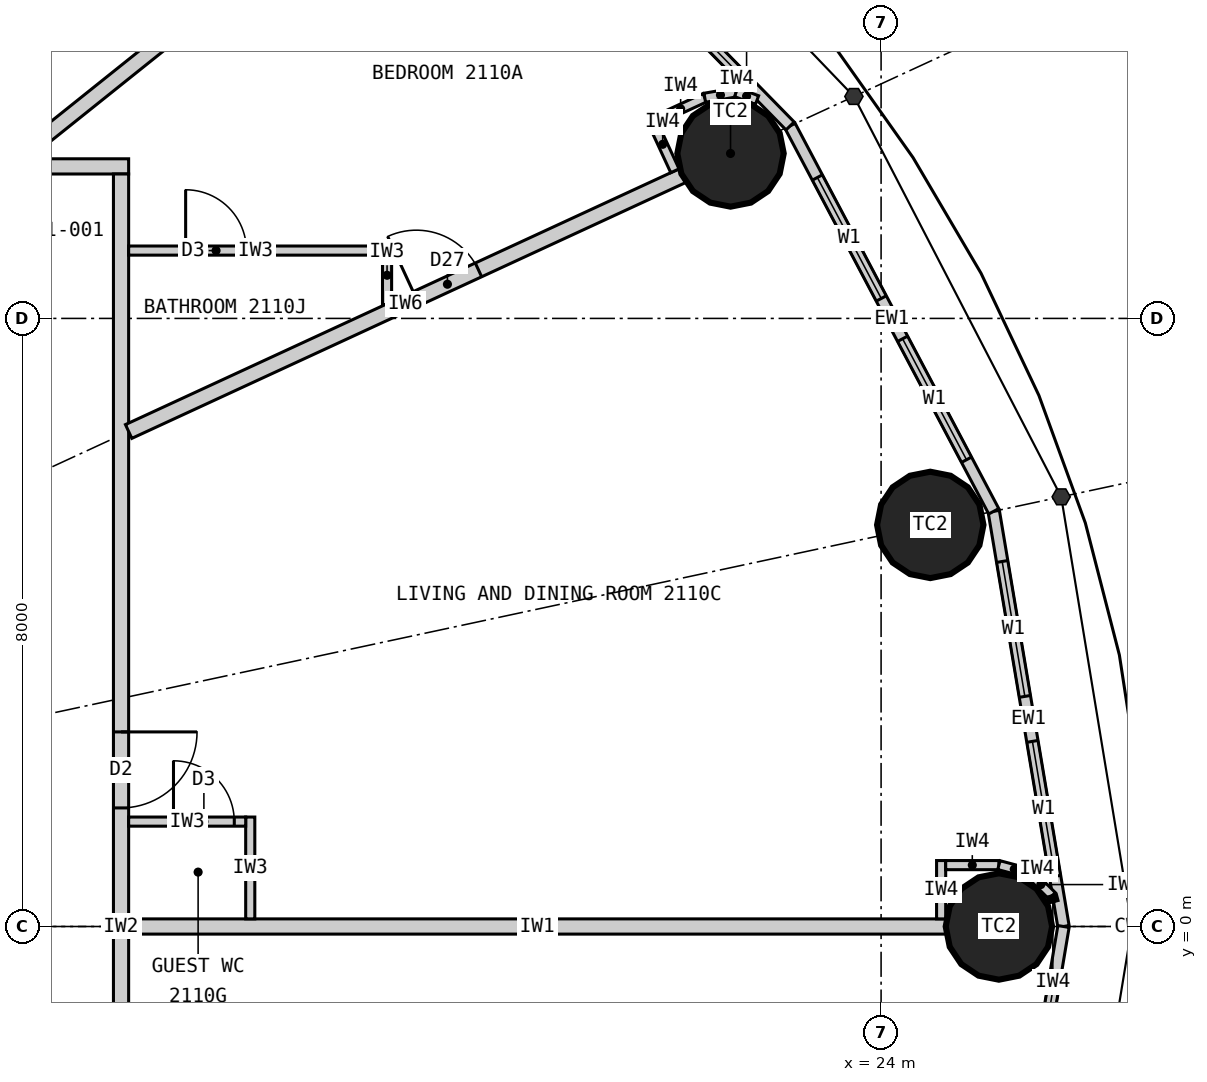
"""IFC4 building model, lengths in metres.
Left out: names, types, materials, properties, quantities, classifications, styles, units other than length and angle.
Written with IfcOpenShell. Run it as: python <this file> out.ifc"""

import sys

from ifc_helpers import new_model, si_unit, direction, frame, frame_2d, origin, origin_2d, place, context, subcontext, project, spatial, rectangle, circle, extrude, element, fill, save


model = new_model("IFC4")
c1 = context("Model", 3, precision=1e-05, world=origin(), true_north=direction((0.0, 1.0)))
c2 = subcontext(c1, "Body", "Model", "MODEL_VIEW")
j1 = project(units=[si_unit("LENGTHUNIT", "METRE"), si_unit("PLANEANGLEUNIT", "RADIAN")], contexts=[c1])
p1 = place(None, origin())
s1 = spatial("IfcSite", under=j1, at=p1, CompositionType="ELEMENT")
p2 = place(p1, origin())
s2 = spatial("IfcBuilding", under=s1, at=p2, CompositionType="ELEMENT")
p3 = place(p2, frame((0.0, 0.0, 83.7)))
s3 = spatial("IfcBuildingStorey", under=s2, at=p3, CompositionType="ELEMENT", Elevation=83.7)
for number, where, z_axis, x_axis in (
    (1, (25.55, 0.0, 0.0), (0.0, 0.0, 1.0), (1.0, 0.0, 0.0)),
    (2, (24.647, 5.283, 0.0), (0.0, 0.0, 1.0), (1.0, 0.0, 0.0)),
    (3, (22.019, 10.17, 0.0), (0.0, 0.0, 1.0), (1.0, 0.0, 0.0)),
):
    element("IfcColumn", number, at=place(p3, frame(where, z_axis=z_axis, x_axis=x_axis)), inside=s3, PredefinedType="COLUMN", context=c2, shape_type="SweptSolid", body=[
        extrude(circle(Radius=0.7, at=origin_2d()), origin(), (0.0, 0.0, 1.0), 3.3),
    ])
p4 = place(p3, frame((26.4, 0.0, 0.0), z_axis=(0.0, 0.0, 1.0), x_axis=(-0.165642551694, 0.986185857264, 0.0)))
e4 = element("IfcWall", 4, at=p4, inside=s3, PredefinedType="ELEMENTEDWALL", context=c2, shape_type="SweptSolid", body=[
    extrude(rectangle(XDim=5.539, YDim=0.15, at=frame_2d((2.77, 0.0))), origin(), (0.0, 0.0, 1.0), 3.12),
])
p5 = place(p4, frame((0.669, 0.0, 0.9)))
e5 = element("IfcOpeningElement", 5, at=p5, cuts=e4, PredefinedType="OPENING", context=c2, shape_type="SweptSolid", body=[
    extrude(rectangle(XDim=1.8, YDim=1.9, at=frame_2d((0.9, 0.95))), frame((0.0, 0.085, 0.0), z_axis=(0.0, -1.0, 0.0), x_axis=(1.0, 0.0, 0.0)), (0.0, 0.0, 1.0), 0.17),
])
p6 = place(p4, frame((3.07, 0.0, 0.9)))
e6 = element("IfcOpeningElement", 6, at=p6, cuts=e4, PredefinedType="OPENING", context=c2, shape_type="SweptSolid", body=[
    extrude(rectangle(XDim=1.8, YDim=1.9, at=frame_2d((0.9, 0.95))), frame((0.0, 0.085, 0.0), z_axis=(0.0, -1.0, 0.0), x_axis=(1.0, 0.0, 0.0)), (0.0, 0.0, 1.0), 0.17),
])
p7 = place(p3, frame((25.482, 5.462, 0.0), z_axis=(0.0, 0.0, 1.0), x_axis=(-0.467296867008, 0.884100468321, 0.0)))
e7 = element("IfcWall", 7, at=p7, inside=s3, PredefinedType="ELEMENTEDWALL", context=c2, shape_type="SweptSolid", body=[
    extrude(rectangle(XDim=5.734, YDim=0.15, at=frame_2d((2.867, 0.0))), origin(), (0.0, 0.0, 1.0), 3.12),
])
p8 = place(p7, frame((0.767, 0.0, 0.9)))
e8 = element("IfcOpeningElement", 8, at=p8, cuts=e7, PredefinedType="OPENING", context=c2, shape_type="SweptSolid", body=[
    extrude(rectangle(XDim=1.8, YDim=1.9, at=frame_2d((0.9, 0.95))), frame((0.0, 0.085, 0.0), z_axis=(0.0, -1.0, 0.0), x_axis=(1.0, 0.0, 0.0)), (0.0, 0.0, 1.0), 0.17),
])
p9 = place(p7, frame((3.167, 0.0, 0.9)))
e9 = element("IfcOpeningElement", 9, at=p9, cuts=e7, PredefinedType="OPENING", context=c2, shape_type="SweptSolid", body=[
    extrude(rectangle(XDim=1.8, YDim=1.9, at=frame_2d((0.9, 0.95))), frame((0.0, 0.085, 0.0), z_axis=(0.0, -1.0, 0.0), x_axis=(1.0, 0.0, 0.0)), (0.0, 0.0, 1.0), 0.17),
])
p10 = place(p3, frame((22.803, 10.532, 0.0), z_axis=(0.0, 0.0, 1.0), x_axis=(-0.699602905915, 0.714531856557, 0.0)))
e10 = element("IfcWall", 10, at=p10, inside=s3, PredefinedType="ELEMENTEDWALL", context=c2, shape_type="SweptSolid", body=[
    extrude(rectangle(XDim=6.051, YDim=0.15, at=frame_2d((3.025, 0.0))), origin(), (0.0, 0.0, 1.0), 3.12),
])
p11 = place(p10, frame((0.926, 0.0, 0.9)))
e11 = element("IfcOpeningElement", 11, at=p11, cuts=e10, PredefinedType="OPENING", context=c2, shape_type="SweptSolid", body=[
    extrude(rectangle(XDim=1.8, YDim=1.9, at=frame_2d((0.9, 0.95))), frame((0.0, 0.085, 0.0), z_axis=(0.0, -1.0, 0.0), x_axis=(1.0, 0.0, 0.0)), (0.0, 0.0, 1.0), 0.17),
])
p12 = place(p10, frame((3.325, 0.0, 0.9)))
e12 = element("IfcOpeningElement", 12, at=p12, cuts=e10, PredefinedType="OPENING", context=c2, shape_type="SweptSolid", body=[
    extrude(rectangle(XDim=1.8, YDim=1.9, at=frame_2d((0.9, 0.95))), frame((0.0, 0.085, 0.0), z_axis=(0.0, -1.0, 0.0), x_axis=(1.0, 0.0, 0.0)), (0.0, 0.0, 1.0), 0.17),
])
p13 = place(p3, frame((25.482, -5.462, 0.0), z_axis=(0.0, 0.0, 1.0), x_axis=(0.165642551694, 0.986185857264, 0.0)))
e13 = element("IfcWall", 13, at=p13, inside=s3, PredefinedType="ELEMENTEDWALL", context=c2, shape_type="SweptSolid", body=[
    extrude(rectangle(XDim=5.539, YDim=0.15, at=frame_2d((2.77, 0.0))), origin(), (0.0, 0.0, 1.0), 3.12),
])
p14 = place(p13, frame((0.669, 0.0, 0.9)))
e14 = element("IfcOpeningElement", 14, at=p14, cuts=e13, PredefinedType="OPENING", context=c2, shape_type="SweptSolid", body=[
    extrude(rectangle(XDim=1.8, YDim=1.9, at=frame_2d((0.9, 0.95))), frame((0.0, 0.085, 0.0), z_axis=(0.0, -1.0, 0.0), x_axis=(1.0, 0.0, 0.0)), (0.0, 0.0, 1.0), 0.17),
])
p15 = place(p13, frame((3.07, 0.0, 0.9)))
e15 = element("IfcOpeningElement", 15, at=p15, cuts=e13, PredefinedType="OPENING", context=c2, shape_type="SweptSolid", body=[
    extrude(rectangle(XDim=1.8, YDim=1.9, at=frame_2d((0.9, 0.95))), frame((0.0, 0.085, 0.0), z_axis=(0.0, -1.0, 0.0), x_axis=(1.0, 0.0, 0.0)), (0.0, 0.0, 1.0), 0.17),
])
p16 = place(p3, frame((-14.1, 10.0, 0.0), z_axis=(0.0, 0.0, 1.0), x_axis=(1.0, 0.0, 0.0)))
e16 = element("IfcWall", 16, at=p16, inside=s3, PredefinedType="PARTITIONING", context=c2, shape_type="SweptSolid", body=[
    extrude(rectangle(XDim=28.2, YDim=0.2, at=frame_2d((14.1, 0.0))), origin(), (0.0, 0.0, 1.0), 3.12),
])
p17 = place(p16, frame((23.865, 0.0, 0.0)))
e17 = element("IfcOpeningElement", 17, at=p17, cuts=e16, PredefinedType="OPENING", context=c2, shape_type="SweptSolid", body=[
    extrude(rectangle(XDim=1.0, YDim=2.2, at=frame_2d((0.5, 1.1))), frame((0.0, 0.11, 0.0), z_axis=(0.0, -1.0, 0.0), x_axis=(1.0, 0.0, 0.0)), (0.0, 0.0, 1.0), 0.22),
])
p18 = place(p16, frame((18.529, 0.0, 0.0)))
e18 = element("IfcOpeningElement", 18, at=p18, cuts=e16, PredefinedType="OPENING", context=c2, shape_type="SweptSolid", body=[
    extrude(rectangle(XDim=1.0, YDim=2.2, at=frame_2d((0.5, 1.1))), frame((0.0, 0.11, 0.0), z_axis=(0.0, -1.0, 0.0), x_axis=(1.0, 0.0, 0.0)), (0.0, 0.0, 1.0), 0.22),
])
p19 = place(p16, frame((14.623, 0.0, 0.0)))
e19 = element("IfcOpeningElement", 19, at=p19, cuts=e16, PredefinedType="OPENING", context=c2, shape_type="SweptSolid", body=[
    extrude(rectangle(XDim=1.0, YDim=2.2, at=frame_2d((0.5, 1.1))), frame((0.0, 0.11, 0.0), z_axis=(0.0, -1.0, 0.0), x_axis=(1.0, 0.0, 0.0)), (0.0, 0.0, 1.0), 0.22),
])
p20 = place(p16, frame((11.24, 0.0, 0.0)))
e20 = element("IfcOpeningElement", 20, at=p20, cuts=e16, PredefinedType="OPENING", context=c2, shape_type="SweptSolid", body=[
    extrude(rectangle(XDim=1.0, YDim=2.2, at=frame_2d((0.5, 1.1))), frame((0.0, 0.11, 0.0), z_axis=(0.0, -1.0, 0.0), x_axis=(1.0, 0.0, 0.0)), (0.0, 0.0, 1.0), 0.22),
])
p21 = place(p16, frame((8.671, 0.0, 0.0)))
e21 = element("IfcOpeningElement", 21, at=p21, cuts=e16, PredefinedType="OPENING", context=c2, shape_type="SweptSolid", body=[
    extrude(rectangle(XDim=1.0, YDim=2.2, at=frame_2d((0.5, 1.1))), frame((0.0, 0.11, 0.0), z_axis=(0.0, -1.0, 0.0), x_axis=(1.0, 0.0, 0.0)), (0.0, 0.0, 1.0), 0.22),
])
p22 = place(p16, frame((2.801, 0.0, 0.0)))
e22 = element("IfcOpeningElement", 22, at=p22, cuts=e16, PredefinedType="OPENING", context=c2, shape_type="SweptSolid", body=[
    extrude(rectangle(XDim=1.0, YDim=2.2, at=frame_2d((0.5, 1.1))), frame((0.0, 0.11, 0.0), z_axis=(0.0, -1.0, 0.0), x_axis=(1.0, 0.0, 0.0)), (0.0, 0.0, 1.0), 0.22),
])
p23 = place(p3, frame((14.0, -9.9, 0.0), z_axis=(0.0, 0.0, 1.0), x_axis=(0.0, 1.0, 0.0)))
e23 = element("IfcWall", 23, at=p23, inside=s3, PredefinedType="PARTITIONING", context=c2, shape_type="SweptSolid", body=[
    extrude(rectangle(XDim=19.8, YDim=0.2, at=frame_2d((9.9, 0.0))), origin(), (0.0, 0.0, 1.0), 3.12),
])
p24 = place(p23, frame((5.948, 0.0, 0.0)))
e24 = element("IfcOpeningElement", 24, at=p24, cuts=e23, PredefinedType="OPENING", context=c2, shape_type="SweptSolid", body=[
    extrude(rectangle(XDim=1.0, YDim=2.2, at=frame_2d((0.5, 1.1))), frame((0.0, 0.11, 0.0), z_axis=(0.0, -1.0, 0.0), x_axis=(1.0, 0.0, 0.0)), (0.0, 0.0, 1.0), 0.22),
])
p25 = place(p23, frame((11.46, 0.0, 0.0)))
e25 = element("IfcOpeningElement", 25, at=p25, cuts=e23, PredefinedType="OPENING", context=c2, shape_type="SweptSolid", body=[
    extrude(rectangle(XDim=1.0, YDim=2.2, at=frame_2d((0.5, 1.1))), frame((0.0, 0.11, 0.0), z_axis=(0.0, -1.0, 0.0), x_axis=(1.0, 0.0, 0.0)), (0.0, 0.0, 1.0), 0.22),
])
p26 = place(p3, frame((14.1, 0.0, 0.0), z_axis=(0.0, 0.0, 1.0), x_axis=(1.0, 0.0, 0.0)))
e26 = element("IfcWall", 26, at=p26, inside=s3, PredefinedType="PARTITIONING", context=c2, shape_type="SweptSolid", body=[
    extrude(rectangle(XDim=10.75, YDim=0.2, at=frame_2d((5.375, 0.0))), origin(), (0.0, 0.0, 1.0), 2.27),
])
p27 = place(p3, frame((14.1, 6.512, 0.0), z_axis=(0.0, 0.0, 1.0), x_axis=(0.907832871056, 0.419332181247, 0.0)))
e27 = element("IfcWall", 27, at=p27, inside=s3, PredefinedType="PARTITIONING", context=c2, shape_type="SweptSolid", body=[
    extrude(rectangle(XDim=8.023, YDim=0.2, at=frame_2d((4.011, 0.0))), origin(), (0.0, 0.0, 1.0), 2.32),
])
p28 = place(p27, frame((4.17, 0.0, 0.0)))
e28 = element("IfcOpeningElement", 28, at=p28, cuts=e27, PredefinedType="OPENING", context=c2, shape_type="SweptSolid", body=[
    extrude(rectangle(XDim=0.9, YDim=2.1, at=frame_2d((0.45, 1.05))), frame((0.0, 0.11, 0.0), z_axis=(0.0, -1.0, 0.0), x_axis=(1.0, 0.0, 0.0)), (0.0, 0.0, 1.0), 0.22),
])
p29 = place(p3, frame((12.625, 10.1, 0.0), z_axis=(0.0, 0.0, 1.0), x_axis=(0.780892451574, 0.624665493744, 0.0)))
e29 = element("IfcWall", 29, at=p29, inside=s3, PredefinedType="PARTITIONING", context=c2, shape_type="SweptSolid", body=[
    extrude(rectangle(XDim=6.045, YDim=0.2, at=frame_2d((3.022, 0.0))), origin(), (0.0, 0.0, 1.0), 2.32),
])
p30 = place(p3, frame((15.7, 0.1, 0.0), z_axis=(0.0, 0.0, 1.0), x_axis=(0.0, 1.0, 0.0)))
e30 = element("IfcWall", 30, at=p30, inside=s3, PredefinedType="PARTITIONING", context=c2, shape_type="SweptSolid", body=[
    extrude(rectangle(XDim=1.34, YDim=0.12, at=frame_2d((0.67, 0.0))), origin(), (0.0, 0.0, 1.0), 3.12),
])
p31 = place(p3, frame((14.1, 1.38, 0.0), z_axis=(0.0, 0.0, 1.0), x_axis=(1.0, 0.0, 0.0)))
e31 = element("IfcWall", 31, at=p31, inside=s3, PredefinedType="PARTITIONING", context=c2, shape_type="SweptSolid", body=[
    extrude(rectangle(XDim=1.54, YDim=0.12, at=frame_2d((0.77, 0.0))), origin(), (0.0, 0.0, 1.0), 2.32),
])
p32 = place(p31, frame((0.59, 0.0, 0.0)))
e32 = element("IfcOpeningElement", 32, at=p32, cuts=e31, PredefinedType="OPENING", context=c2, shape_type="SweptSolid", body=[
    extrude(rectangle(XDim=0.8, YDim=2.1, at=frame_2d((0.4, 1.05))), frame((0.0, 0.07, 0.0), z_axis=(0.0, -1.0, 0.0), x_axis=(1.0, 0.0, 0.0)), (0.0, 0.0, 1.0), 0.14),
])
p33 = place(p3, frame((17.5, 8.183, 0.0), z_axis=(0.0, 0.0, 1.0), x_axis=(0.0, 1.0, 0.0)))
e33 = element("IfcWall", 33, at=p33, inside=s3, PredefinedType="PARTITIONING", context=c2, shape_type="SweptSolid", body=[
    extrude(rectangle(XDim=0.77, YDim=0.12, at=frame_2d((0.385, 0.0))), origin(), (0.0, 0.0, 1.0), 3.12),
])
p34 = place(p3, frame((14.1, 8.893, 0.0), z_axis=(0.0, 0.0, 1.0), x_axis=(1.0, 0.0, 0.0)))
e34 = element("IfcWall", 34, at=p34, inside=s3, PredefinedType="PARTITIONING", context=c2, shape_type="SweptSolid", body=[
    extrude(rectangle(XDim=3.34, YDim=0.12, at=frame_2d((1.67, 0.0))), origin(), (0.0, 0.0, 1.0), 3.12),
])
p35 = place(p34, frame((0.75, 0.0, 0.0)))
e35 = element("IfcOpeningElement", 35, at=p35, cuts=e34, PredefinedType="OPENING", context=c2, shape_type="SweptSolid", body=[
    extrude(rectangle(XDim=0.8, YDim=2.1, at=frame_2d((0.4, 1.05))), frame((0.0, 0.07, 0.0), z_axis=(0.0, -1.0, 0.0), x_axis=(1.0, 0.0, 0.0)), (0.0, 0.0, 1.0), 0.14),
])
p36 = place(p3, frame((24.79, 0.1, 0.0), z_axis=(0.0, 0.0, 1.0), x_axis=(0.0, 1.0, 0.0)))
e36 = element("IfcWall", 36, at=p36, inside=s3, PredefinedType="PARTITIONING", context=c2, shape_type="SweptSolid", body=[
    extrude(rectangle(XDim=0.767, YDim=0.12, at=frame_2d((0.384, 0.0))), origin(), (0.0, 0.0, 1.0), 3.12),
])
p37 = place(p3, frame((24.85, 0.808, 0.0), z_axis=(0.0, 0.0, 1.0), x_axis=(1.0, 0.0, 0.0)))
e37 = element("IfcWall", 37, at=p37, inside=s3, PredefinedType="PARTITIONING", context=c2, shape_type="SweptSolid", body=[
    extrude(rectangle(XDim=0.7, YDim=0.12, at=frame_2d((0.35, 0.0))), origin(), (0.0, 0.0, 1.0), 3.12),
])
p38 = place(p3, frame((25.55, 0.808, 0.0), z_axis=(0.0, 0.0, 1.0), x_axis=(0.965807183573, -0.2592614205, 0.0)))
e38 = element("IfcWall", 38, at=p38, inside=s3, PredefinedType="PARTITIONING", context=c2, shape_type="SweptSolid", body=[
    extrude(rectangle(XDim=0.418, YDim=0.12, at=frame_2d((0.209, 0.0))), origin(), (0.0, 0.0, 1.0), 3.12),
])
p39 = place(p3, frame((25.954, 0.699, 0.0), z_axis=(0.0, 0.0, 1.0), x_axis=(0.707106781187, -0.707106781187, 0.0)))
e39 = element("IfcWall", 39, at=p39, inside=s3, PredefinedType="PARTITIONING", context=c2, shape_type="SweptSolid", body=[
    extrude(rectangle(XDim=0.418, YDim=0.12, at=frame_2d((0.209, 0.0))), origin(), (0.0, 0.0, 1.0), 3.12),
])
p40 = place(p3, frame((26.249, 0.404, 0.0), z_axis=(0.0, 0.0, 1.0), x_axis=(0.259754282609, -0.965674744759, 0.0)))
e40 = element("IfcWall", 40, at=p40, inside=s3, PredefinedType="PARTITIONING", context=c2, shape_type="SweptSolid", body=[
    extrude(rectangle(XDim=0.08, YDim=0.12, at=frame_2d((0.04, 0.0))), origin(), (0.0, 0.0, 1.0), 3.12),
])
p41 = place(p3, frame((21.287, 9.942, 0.0), z_axis=(0.0, 0.0, 1.0), x_axis=(-0.419259891039, 0.907866258744, 0.0)))
e41 = element("IfcWall", 41, at=p41, inside=s3, PredefinedType="PARTITIONING", context=c2, shape_type="SweptSolid", body=[
    extrude(rectangle(XDim=0.768, YDim=0.12, at=frame_2d((0.384, 0.0))), origin(), (0.0, 0.0, 1.0), 3.12),
])
p42 = place(p3, frame((21.045, 10.61, 0.0), z_axis=(0.0, 0.0, 1.0), x_axis=(0.907877701396, 0.419235112208, 0.0)))
e42 = element("IfcWall", 42, at=p42, inside=s3, PredefinedType="PARTITIONING", context=c2, shape_type="SweptSolid", body=[
    extrude(rectangle(XDim=0.7, YDim=0.12, at=frame_2d((0.35, 0.0))), origin(), (0.0, 0.0, 1.0), 3.12),
])
p43 = place(p3, frame((21.68, 10.903, 0.0), z_axis=(0.0, 0.0, 1.0), x_axis=(0.985446622073, 0.169985161247, 0.0)))
e43 = element("IfcWall", 43, at=p43, inside=s3, PredefinedType="PARTITIONING", context=c2, shape_type="SweptSolid", body=[
    extrude(rectangle(XDim=0.418, YDim=0.12, at=frame_2d((0.209, 0.0))), origin(), (0.0, 0.0, 1.0), 3.12),
])
p44 = place(p3, frame((22.092, 10.974, 0.0), z_axis=(0.0, 0.0, 1.0), x_axis=(0.938428160676, -0.345474437912, 0.0)))
e44 = element("IfcWall", 44, at=p44, inside=s3, PredefinedType="PARTITIONING", context=c2, shape_type="SweptSolid", body=[
    extrude(rectangle(XDim=0.294, YDim=0.12, at=frame_2d((0.147, 0.0))), origin(), (0.0, 0.0, 1.0), 3.12),
])
p45 = place(p5, origin())
e45 = element("IfcWindow", 45, at=p45, inside=s3, PartitioningType="SINGLE_PANEL", PredefinedType="WINDOW", context=c2, shape_type="SweptSolid", body=[
    extrude(rectangle(XDim=1.8, YDim=1.9, at=frame_2d((0.9, 0.95))), frame((0.0, 0.03, 0.0), z_axis=(0.0, -1.0, 0.0), x_axis=(1.0, 0.0, 0.0)), (0.0, 0.0, 1.0), 0.06),
])
fill(e5, e45)
p46 = place(p6, origin())
e46 = element("IfcWindow", 46, at=p46, inside=s3, PartitioningType="SINGLE_PANEL", PredefinedType="WINDOW", context=c2, shape_type="SweptSolid", body=[
    extrude(rectangle(XDim=1.8, YDim=1.9, at=frame_2d((0.9, 0.95))), frame((0.0, 0.03, 0.0), z_axis=(0.0, -1.0, 0.0), x_axis=(1.0, 0.0, 0.0)), (0.0, 0.0, 1.0), 0.06),
])
fill(e6, e46)
p47 = place(p8, origin())
e47 = element("IfcWindow", 47, at=p47, inside=s3, PartitioningType="SINGLE_PANEL", PredefinedType="WINDOW", context=c2, shape_type="SweptSolid", body=[
    extrude(rectangle(XDim=1.8, YDim=1.9, at=frame_2d((0.9, 0.95))), frame((0.0, 0.03, 0.0), z_axis=(0.0, -1.0, 0.0), x_axis=(1.0, 0.0, 0.0)), (0.0, 0.0, 1.0), 0.06),
])
fill(e8, e47)
p48 = place(p9, origin())
e48 = element("IfcWindow", 48, at=p48, inside=s3, PartitioningType="SINGLE_PANEL", PredefinedType="WINDOW", context=c2, shape_type="SweptSolid", body=[
    extrude(rectangle(XDim=1.8, YDim=1.9, at=frame_2d((0.9, 0.95))), frame((0.0, 0.03, 0.0), z_axis=(0.0, -1.0, 0.0), x_axis=(1.0, 0.0, 0.0)), (0.0, 0.0, 1.0), 0.06),
])
fill(e9, e48)
p49 = place(p11, origin())
e49 = element("IfcWindow", 49, at=p49, inside=s3, PartitioningType="SINGLE_PANEL", PredefinedType="WINDOW", context=c2, shape_type="SweptSolid", body=[
    extrude(rectangle(XDim=1.8, YDim=1.9, at=frame_2d((0.9, 0.95))), frame((0.0, 0.03, 0.0), z_axis=(0.0, -1.0, 0.0), x_axis=(1.0, 0.0, 0.0)), (0.0, 0.0, 1.0), 0.06),
])
fill(e11, e49)
p50 = place(p15, origin())
e50 = element("IfcWindow", 50, at=p50, inside=s3, PartitioningType="SINGLE_PANEL", PredefinedType="WINDOW", context=c2, shape_type="SweptSolid", body=[
    extrude(rectangle(XDim=1.8, YDim=1.9, at=frame_2d((0.9, 0.95))), frame((0.0, 0.03, 0.0), z_axis=(0.0, -1.0, 0.0), x_axis=(1.0, 0.0, 0.0)), (0.0, 0.0, 1.0), 0.06),
])
fill(e15, e50)
p51 = place(p32, origin())
e51 = element("IfcDoor", 51, at=p51, inside=s3, OperationType="SINGLE_SWING_LEFT", PredefinedType="DOOR", context=c2, shape_type="SweptSolid", body=[
    extrude(rectangle(XDim=0.8, YDim=2.1, at=frame_2d((0.4, 1.05))), frame((0.0, 0.025, 0.0), z_axis=(0.0, -1.0, 0.0), x_axis=(1.0, 0.0, 0.0)), (0.0, 0.0, 1.0), 0.05),
])
fill(e32, e51)
p52 = place(p25, origin())
e52 = element("IfcDoor", 52, at=p52, inside=s3, OperationType="SINGLE_SWING_RIGHT", PredefinedType="DOOR", context=c2, shape_type="SweptSolid", body=[
    extrude(rectangle(XDim=1.0, YDim=2.2, at=frame_2d((0.5, 1.1))), frame((0.0, 0.025, 0.0), z_axis=(0.0, -1.0, 0.0), x_axis=(1.0, 0.0, 0.0)), (0.0, 0.0, 1.0), 0.05),
])
fill(e25, e52)
p53 = place(p35, origin())
e53 = element("IfcDoor", 53, at=p53, inside=s3, OperationType="SINGLE_SWING_LEFT", PredefinedType="DOOR", context=c2, shape_type="SweptSolid", body=[
    extrude(rectangle(XDim=0.8, YDim=2.1, at=frame_2d((0.4, 1.05))), frame((0.0, 0.025, 0.0), z_axis=(0.0, -1.0, 0.0), x_axis=(1.0, 0.0, 0.0)), (0.0, 0.0, 1.0), 0.05),
])
fill(e35, e53)
p54 = place(p28, origin())
e54 = element("IfcDoor", 54, at=p54, inside=s3, OperationType="SINGLE_SWING_LEFT", PredefinedType="DOOR", context=c2, shape_type="SweptSolid", body=[
    extrude(rectangle(XDim=0.9, YDim=2.1, at=frame_2d((0.45, 1.05))), frame((0.0, 0.025, 0.0), z_axis=(0.0, -1.0, 0.0), x_axis=(1.0, 0.0, 0.0)), (0.0, 0.0, 1.0), 0.05),
])
fill(e28, e54)
save(model, sys.argv[1])
